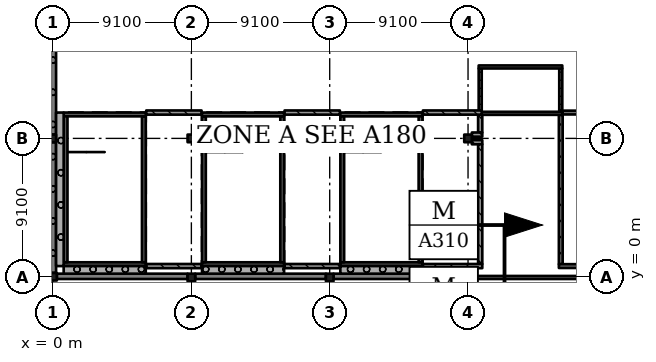
"""IFC4 building model, lengths in metres.
Left out: names, types, materials, properties, quantities, classifications, styles, units other than length and angle.
Written with IfcOpenShell. Run it as: python <this file> out.ifc"""

import sys

from ifc_helpers import new_model, si_unit, direction, frame, frame_2d, origin, origin_2d, place, context, subcontext, project, spatial, rectangle, extrude, element, fill, save


model = new_model("IFC4")
c1 = context("Model", 3, precision=1e-05, world=origin(), true_north=direction((0.0, 1.0)))
c2 = subcontext(c1, "Body", "Model", "MODEL_VIEW")
j1 = project(units=[si_unit("LENGTHUNIT", "METRE"), si_unit("PLANEANGLEUNIT", "RADIAN")], contexts=[c1])
p1 = place(None, origin())
s1 = spatial("IfcSite", under=j1, at=p1, CompositionType="ELEMENT")
p2 = place(p1, origin())
s2 = spatial("IfcBuilding", under=s1, at=p2, CompositionType="ELEMENT")
p3 = place(p2, frame((0.0, 0.0, 29.12)))
s3 = spatial("IfcBuildingStorey", under=s2, at=p3, CompositionType="ELEMENT", Elevation=29.12)
for number, where, z_axis, x_axis in (
    (1, (0.0, 0.0, 0.0), (0.0, 0.0, 1.0), (1.0, 0.0, 0.0)),
    (2, (-0.05, 9.1, 0.0), (0.0, 0.0, 1.0), (1.0, 0.0, 0.0)),
    (3, (9.1, -0.05, 0.0), (0.0, 0.0, 1.0), (1.0, 0.0, 0.0)),
    (4, (9.1, 9.1, 0.0), (0.0, 0.0, 1.0), (1.0, 0.0, 0.0)),
    (5, (18.2, -0.05, 0.0), (0.0, 0.0, 1.0), (1.0, 0.0, 0.0)),
    (6, (18.2, 9.1, 0.0), (0.0, 0.0, 1.0), (1.0, 0.0, 0.0)),
    (7, (27.3, -0.1, 0.0), (0.0, 0.0, 1.0), (1.0, 0.0, 0.0)),
    (8, (27.3, 9.1, 0.0), (0.0, 0.0, 1.0), (1.0, 0.0, 0.0)),
):
    element("IfcColumn", number, at=place(p3, frame(where, z_axis=z_axis, x_axis=x_axis)), inside=s3, PredefinedType="COLUMN", context=c2, shape_type="SweptSolid", body=[
        extrude(rectangle(XDim=0.5, YDim=0.5, at=origin_2d()), origin(), (0.0, 0.0, 1.0), 4.55),
    ])
p4 = place(p3, frame((6.1, 0.825, 0.0), z_axis=(0.0, 0.0, 1.0), x_axis=(-1.0, 0.0, 0.0)))
e9 = element("IfcWall", 9, at=p4, inside=s3, PredefinedType="SHEAR", context=c2, shape_type="SweptSolid", body=[
    extrude(rectangle(XDim=5.4, YDim=0.25, at=frame_2d((2.7, 0.0))), origin(), (0.0, 0.0, 1.0), 4.55),
])
p5 = place(p3, frame((6.1, 10.675, 0.0), z_axis=(0.0, 0.0, 1.0), x_axis=(-1.0, 0.0, 0.0)))
e10 = element("IfcWall", 10, at=p5, inside=s3, PredefinedType="SHEAR", context=c2, shape_type="SweptSolid", body=[
    extrude(rectangle(XDim=5.4, YDim=0.25, at=frame_2d((2.7, 0.0))), origin(), (0.0, 0.0, 1.0), 4.55),
])
p6 = place(p5, frame((1.5, 0.0, 0.0)))
e11 = element("IfcOpeningElement", 11, at=p6, cuts=e10, PredefinedType="OPENING", context=c2, shape_type="SweptSolid", body=[
    extrude(rectangle(XDim=2.4, YDim=2.1, at=frame_2d((1.2, 1.05))), frame((0.0, 0.135, 0.0), z_axis=(0.0, -1.0, 0.0), x_axis=(1.0, 0.0, 0.0)), (0.0, 0.0, 1.0), 0.27),
])
for number, where, z_axis, x_axis in (
    (12, (0.825, 10.55, 0.0), (0.0, 0.0, 1.0), (0.0, -1.0, 0.0)),
    (13, (5.975, 10.55, 0.0), (0.0, 0.0, 1.0), (0.0, -1.0, 0.0)),
):
    element("IfcWall", number, at=place(p3, frame(where, z_axis=z_axis, x_axis=x_axis)), inside=s3, PredefinedType="SHEAR", context=c2, shape_type="SweptSolid", body=[
        extrude(rectangle(XDim=9.6, YDim=0.25, at=frame_2d((4.8, 0.0))), origin(), (0.0, 0.0, 1.0), 4.55),
    ])
p7 = place(p3, frame((15.2, 0.825, 0.0), z_axis=(0.0, 0.0, 1.0), x_axis=(-1.0, 0.0, 0.0)))
e14 = element("IfcWall", 14, at=p7, inside=s3, PredefinedType="SHEAR", context=c2, shape_type="SweptSolid", body=[
    extrude(rectangle(XDim=5.4, YDim=0.25, at=frame_2d((2.7, 0.0))), origin(), (0.0, 0.0, 1.0), 4.55),
])
p8 = place(p3, frame((15.2, 10.675, 0.0), z_axis=(0.0, 0.0, 1.0), x_axis=(-1.0, 0.0, 0.0)))
e15 = element("IfcWall", 15, at=p8, inside=s3, PredefinedType="SHEAR", context=c2, shape_type="SweptSolid", body=[
    extrude(rectangle(XDim=5.4, YDim=0.25, at=frame_2d((2.7, 0.0))), origin(), (0.0, 0.0, 1.0), 4.55),
])
p9 = place(p8, frame((1.5, 0.0, 0.0)))
e16 = element("IfcOpeningElement", 16, at=p9, cuts=e15, PredefinedType="OPENING", context=c2, shape_type="SweptSolid", body=[
    extrude(rectangle(XDim=2.4, YDim=2.1, at=frame_2d((1.2, 1.05))), frame((0.0, 0.135, 0.0), z_axis=(0.0, -1.0, 0.0), x_axis=(1.0, 0.0, 0.0)), (0.0, 0.0, 1.0), 0.27),
])
for number, where, z_axis, x_axis in (
    (17, (9.925, 10.55, 0.0), (0.0, 0.0, 1.0), (0.0, -1.0, 0.0)),
    (18, (15.075, 10.55, 0.0), (0.0, 0.0, 1.0), (0.0, -1.0, 0.0)),
):
    element("IfcWall", number, at=place(p3, frame(where, z_axis=z_axis, x_axis=x_axis)), inside=s3, PredefinedType="SHEAR", context=c2, shape_type="SweptSolid", body=[
        extrude(rectangle(XDim=9.6, YDim=0.25, at=frame_2d((4.8, 0.0))), origin(), (0.0, 0.0, 1.0), 4.55),
    ])
p10 = place(p3, frame((24.3, 0.825, 0.0), z_axis=(0.0, 0.0, 1.0), x_axis=(-1.0, 0.0, 0.0)))
e19 = element("IfcWall", 19, at=p10, inside=s3, PredefinedType="SHEAR", context=c2, shape_type="SweptSolid", body=[
    extrude(rectangle(XDim=5.4, YDim=0.25, at=frame_2d((2.7, 0.0))), origin(), (0.0, 0.0, 1.0), 4.55),
])
p11 = place(p3, frame((24.3, 10.675, 0.0), z_axis=(0.0, 0.0, 1.0), x_axis=(-1.0, 0.0, 0.0)))
e20 = element("IfcWall", 20, at=p11, inside=s3, PredefinedType="SHEAR", context=c2, shape_type="SweptSolid", body=[
    extrude(rectangle(XDim=5.4, YDim=0.25, at=frame_2d((2.7, 0.0))), origin(), (0.0, 0.0, 1.0), 4.55),
])
p12 = place(p11, frame((1.5, 0.0, 0.0)))
e21 = element("IfcOpeningElement", 21, at=p12, cuts=e20, PredefinedType="OPENING", context=c2, shape_type="SweptSolid", body=[
    extrude(rectangle(XDim=2.4, YDim=2.1, at=frame_2d((1.2, 1.05))), frame((0.0, 0.135, 0.0), z_axis=(0.0, -1.0, 0.0), x_axis=(1.0, 0.0, 0.0)), (0.0, 0.0, 1.0), 0.27),
])
for number, where, z_axis, x_axis in (
    (22, (19.025, 10.55, 0.0), (0.0, 0.0, 1.0), (0.0, -1.0, 0.0)),
    (23, (24.175, 10.55, 0.0), (0.0, 0.0, 1.0), (0.0, -1.0, 0.0)),
):
    element("IfcWall", number, at=place(p3, frame(where, z_axis=z_axis, x_axis=x_axis)), inside=s3, PredefinedType="SHEAR", context=c2, shape_type="SweptSolid", body=[
        extrude(rectangle(XDim=9.6, YDim=0.25, at=frame_2d((4.8, 0.0))), origin(), (0.0, 0.0, 1.0), 4.55),
    ])
p13 = place(p3, frame((0.25, 0.025, 0.0), z_axis=(0.0, 0.0, 1.0), x_axis=(1.0, 0.0, 0.0)))
e24 = element("IfcWall", 24, at=p13, inside=s3, PredefinedType="SOLIDWALL", context=c2, shape_type="SweptSolid", body=[
    extrude(rectangle(XDim=8.6, YDim=0.35, at=frame_2d((4.3, 0.0))), origin(), (0.0, 0.0, 1.0), 4.5),
])
p14 = place(p3, frame((9.35, 0.025, 0.0), z_axis=(0.0, 0.0, 1.0), x_axis=(1.0, 0.0, 0.0)))
e25 = element("IfcWall", 25, at=p14, inside=s3, PredefinedType="SOLIDWALL", context=c2, shape_type="SweptSolid", body=[
    extrude(rectangle(XDim=8.6, YDim=0.35, at=frame_2d((4.3, 0.0))), origin(), (0.0, 0.0, 1.0), 4.5),
])
p15 = place(p3, frame((18.45, 0.025, 0.0), z_axis=(0.0, 0.0, 1.0), x_axis=(1.0, 0.0, 0.0)))
e26 = element("IfcWall", 26, at=p15, inside=s3, PredefinedType="SOLIDWALL", context=c2, shape_type="SweptSolid", body=[
    extrude(rectangle(XDim=8.6, YDim=0.35, at=frame_2d((4.3, 0.0))), origin(), (0.0, 0.0, 1.0), 4.5),
])
p16 = place(p3, frame((27.55, -0.05, 0.0), z_axis=(0.0, 0.0, 1.0), x_axis=(1.0, 0.0, 0.0)))
e27 = element("IfcWall", 27, at=p16, inside=s3, PredefinedType="SOLIDWALL", context=c2, shape_type="SweptSolid", body=[
    extrude(rectangle(XDim=8.6, YDim=0.2, at=frame_2d((4.3, 0.0))), origin(), (0.0, 0.0, 1.0), 4.5),
])
p17 = place(p16, frame((0.65, 0.0, 0.6)))
e28 = element("IfcOpeningElement", 28, at=p17, cuts=e27, PredefinedType="OPENING", context=c2, shape_type="SweptSolid", body=[
    extrude(rectangle(XDim=3.0, YDim=3.0, at=frame_2d((1.5, 1.5))), frame((0.0, 0.11, 0.0), z_axis=(0.0, -1.0, 0.0), x_axis=(1.0, 0.0, 0.0)), (0.0, 0.0, 1.0), 0.22),
])
p18 = place(p16, frame((4.95, 0.0, 0.6)))
e29 = element("IfcOpeningElement", 29, at=p18, cuts=e27, PredefinedType="OPENING", context=c2, shape_type="SweptSolid", body=[
    extrude(rectangle(XDim=3.0, YDim=3.0, at=frame_2d((1.5, 1.5))), frame((0.0, 0.11, 0.0), z_axis=(0.0, -1.0, 0.0), x_axis=(1.0, 0.0, 0.0)), (0.0, 0.0, 1.0), 0.22),
])
p19 = place(p3, frame((0.025, 17.95, 0.0), z_axis=(0.0, 0.0, 1.0), x_axis=(0.0, -1.0, 0.0)))
e30 = element("IfcWall", 30, at=p19, inside=s3, PredefinedType="SOLIDWALL", context=c2, shape_type="SweptSolid", body=[
    extrude(rectangle(XDim=8.6, YDim=0.35, at=frame_2d((4.3, 0.0))), origin(), (0.0, 0.0, 1.0), 4.5),
])
p20 = place(p3, frame((0.025, 8.85, 0.0), z_axis=(0.0, 0.0, 1.0), x_axis=(0.0, -1.0, 0.0)))
e31 = element("IfcWall", 31, at=p20, inside=s3, PredefinedType="SOLIDWALL", context=c2, shape_type="SweptSolid", body=[
    extrude(rectangle(XDim=8.6, YDim=0.35, at=frame_2d((4.3, 0.0))), origin(), (0.0, 0.0, 1.0), 4.5),
])
p21 = place(p3, frame((0.7, 0.45, 0.0), z_axis=(0.0, 0.0, 1.0), x_axis=(1.0, 0.0, 0.0)))
e32 = element("IfcWall", 32, at=p21, inside=s3, PredefinedType="SOLIDWALL", context=c2, shape_type="SweptSolid", body=[
    extrude(rectangle(XDim=5.4, YDim=0.5, at=frame_2d((2.7, 0.0))), origin(), (0.0, 0.0, 1.0), 3.88),
])
p22 = place(p3, frame((0.45, 0.7, 0.0), z_axis=(0.0, 0.0, 1.0), x_axis=(0.0, 1.0, 0.0)))
e33 = element("IfcWall", 33, at=p22, inside=s3, PredefinedType="SOLIDWALL", context=c2, shape_type="SweptSolid", body=[
    extrude(rectangle(XDim=10.1, YDim=0.5, at=frame_2d((5.05, 0.0))), origin(), (0.0, 0.0, 1.0), 3.88),
])
p23 = place(p3, frame((9.8, 0.45, 0.0), z_axis=(0.0, 0.0, 1.0), x_axis=(1.0, 0.0, 0.0)))
e34 = element("IfcWall", 34, at=p23, inside=s3, PredefinedType="SOLIDWALL", context=c2, shape_type="SweptSolid", body=[
    extrude(rectangle(XDim=5.4, YDim=0.5, at=frame_2d((2.7, 0.0))), origin(), (0.0, 0.0, 1.0), 3.88),
])
p24 = place(p3, frame((18.9, 0.45, 0.0), z_axis=(0.0, 0.0, 1.0), x_axis=(1.0, 0.0, 0.0)))
e35 = element("IfcWall", 35, at=p24, inside=s3, PredefinedType="SOLIDWALL", context=c2, shape_type="SweptSolid", body=[
    extrude(rectangle(XDim=5.4, YDim=0.5, at=frame_2d((2.7, 0.0))), origin(), (0.0, 0.0, 1.0), 3.88),
])
p25 = place(p3, frame((9.35, 8.85, 0.0), z_axis=(0.0, 0.0, 1.0), x_axis=(1.0, 0.0, 0.0)))
e36 = element("IfcWall", 36, at=p25, inside=s3, PredefinedType="SOLIDWALL", context=c2, shape_type="SweptSolid", body=[
    extrude(rectangle(XDim=0.42, YDim=0.275, at=frame_2d((0.21, 0.0))), origin(), (0.0, 0.0, 1.0), 3.88),
])
p26 = place(p3, frame((9.77, 0.7, 0.0), z_axis=(0.0, 0.0, 1.0), x_axis=(-1.0, 0.0, 0.0)))
e37 = element("IfcWall", 37, at=p26, inside=s3, PredefinedType="SOLIDWALL", context=c2, shape_type="SweptSolid", body=[
    extrude(rectangle(XDim=3.64, YDim=0.275, at=frame_2d((1.82, 0.0))), origin(), (0.0, 0.0, 1.0), 3.88),
])
p27 = place(p3, frame((9.77, 9.35, 0.0), z_axis=(0.0, 0.0, 1.0), x_axis=(-1.0, 0.0, 0.0)))
e38 = element("IfcWall", 38, at=p27, inside=s3, PredefinedType="SOLIDWALL", context=c2, shape_type="SweptSolid", body=[
    extrude(rectangle(XDim=0.42, YDim=0.275, at=frame_2d((0.21, 0.0))), origin(), (0.0, 0.0, 1.0), 3.88),
])
p28 = place(p3, frame((9.77, 10.8, 0.0), z_axis=(0.0, 0.0, 1.0), x_axis=(-1.0, 0.0, 0.0)))
e39 = element("IfcWall", 39, at=p28, inside=s3, PredefinedType="SOLIDWALL", context=c2, shape_type="SweptSolid", body=[
    extrude(rectangle(XDim=3.64, YDim=0.275, at=frame_2d((1.82, 0.0))), origin(), (0.0, 0.0, 1.0), 3.88),
])
p29 = place(p28, frame((1.25, 0.0, 0.0)))
e40 = element("IfcOpeningElement", 40, at=p29, cuts=e39, PredefinedType="OPENING", context=c2, shape_type="SweptSolid", body=[
    extrude(rectangle(XDim=1.2, YDim=2.4, at=frame_2d((0.6, 1.2))), frame((0.0, 0.147, 0.0), z_axis=(0.0, -1.0, 0.0), x_axis=(1.0, 0.0, 0.0)), (0.0, 0.0, 1.0), 0.295),
])
p30 = place(p3, frame((18.45, 8.85, 0.0), z_axis=(0.0, 0.0, 1.0), x_axis=(1.0, 0.0, 0.0)))
e41 = element("IfcWall", 41, at=p30, inside=s3, PredefinedType="SOLIDWALL", context=c2, shape_type="SweptSolid", body=[
    extrude(rectangle(XDim=0.42, YDim=0.275, at=frame_2d((0.21, 0.0))), origin(), (0.0, 0.0, 1.0), 3.88),
])
p31 = place(p3, frame((18.87, 0.7, 0.0), z_axis=(0.0, 0.0, 1.0), x_axis=(-1.0, 0.0, 0.0)))
e42 = element("IfcWall", 42, at=p31, inside=s3, PredefinedType="SOLIDWALL", context=c2, shape_type="SweptSolid", body=[
    extrude(rectangle(XDim=3.64, YDim=0.275, at=frame_2d((1.82, 0.0))), origin(), (0.0, 0.0, 1.0), 3.88),
])
p32 = place(p3, frame((18.87, 9.35, 0.0), z_axis=(0.0, 0.0, 1.0), x_axis=(-1.0, 0.0, 0.0)))
e43 = element("IfcWall", 43, at=p32, inside=s3, PredefinedType="SOLIDWALL", context=c2, shape_type="SweptSolid", body=[
    extrude(rectangle(XDim=0.42, YDim=0.275, at=frame_2d((0.21, 0.0))), origin(), (0.0, 0.0, 1.0), 3.88),
])
p33 = place(p3, frame((18.87, 10.8, 0.0), z_axis=(0.0, 0.0, 1.0), x_axis=(-1.0, 0.0, 0.0)))
e44 = element("IfcWall", 44, at=p33, inside=s3, PredefinedType="SOLIDWALL", context=c2, shape_type="SweptSolid", body=[
    extrude(rectangle(XDim=3.64, YDim=0.275, at=frame_2d((1.82, 0.0))), origin(), (0.0, 0.0, 1.0), 3.88),
])
p34 = place(p33, frame((1.25, 0.0, 0.0)))
e45 = element("IfcOpeningElement", 45, at=p34, cuts=e44, PredefinedType="OPENING", context=c2, shape_type="SweptSolid", body=[
    extrude(rectangle(XDim=1.2, YDim=2.4, at=frame_2d((0.6, 1.2))), frame((0.0, 0.147, 0.0), z_axis=(0.0, -1.0, 0.0), x_axis=(1.0, 0.0, 0.0)), (0.0, 0.0, 1.0), 0.295),
])
p35 = place(p3, frame((27.55, 8.85, 0.0), z_axis=(0.0, 0.0, 1.0), x_axis=(1.0, 0.0, 0.0)))
e46 = element("IfcWall", 46, at=p35, inside=s3, PredefinedType="SOLIDWALL", context=c2, shape_type="SweptSolid", body=[
    extrude(rectangle(XDim=0.688, YDim=0.275, at=frame_2d((0.344, 0.0))), origin(), (0.0, 0.0, 1.0), 3.88),
])
p36 = place(p3, frame((28.1, 8.712, 0.0), z_axis=(0.0, 0.0, 1.0), x_axis=(0.0, -1.0, 0.0)))
e47 = element("IfcWall", 47, at=p36, inside=s3, PredefinedType="SOLIDWALL", context=c2, shape_type="SweptSolid", body=[
    extrude(rectangle(XDim=7.875, YDim=0.275, at=frame_2d((3.938, 0.0))), origin(), (0.0, 0.0, 1.0), 3.88),
])
p37 = place(p3, frame((28.1, 10.65, 0.0), z_axis=(0.0, 0.0, 1.0), x_axis=(0.0, -1.0, 0.0)))
e48 = element("IfcWall", 48, at=p37, inside=s3, PredefinedType="SOLIDWALL", context=c2, shape_type="SweptSolid", body=[
    extrude(rectangle(XDim=1.162, YDim=0.275, at=frame_2d((0.581, 0.0))), origin(), (0.0, 0.0, 1.0), 3.88),
])
p38 = place(p3, frame((28.1, 13.7, 0.0), z_axis=(0.0, 0.0, 1.0), x_axis=(0.0, -1.0, 0.0)))
e49 = element("IfcWall", 49, at=p38, inside=s3, PredefinedType="PARTITIONING", context=c2, shape_type="SweptSolid", body=[
    extrude(rectangle(XDim=2.762, YDim=0.2, at=frame_2d((1.381, 0.0))), origin(), (0.0, 0.0, 1.0), 3.88),
])
p39 = place(p38, frame((0.45, 0.0, 0.0)))
e50 = element("IfcOpeningElement", 50, at=p39, cuts=e49, PredefinedType="OPENING", context=c2, shape_type="SweptSolid", body=[
    extrude(rectangle(XDim=1.8, YDim=2.4, at=frame_2d((0.9, 1.2))), frame((0.0, 0.11, 0.0), z_axis=(0.0, -1.0, 0.0), x_axis=(1.0, 0.0, 0.0)), (0.0, 0.0, 1.0), 0.22),
])
p40 = place(p3, frame((28.2, 10.8, 0.0), z_axis=(0.0, 0.0, 1.0), x_axis=(-1.0, 0.0, 0.0)))
e51 = element("IfcWall", 51, at=p40, inside=s3, PredefinedType="SOLIDWALL", context=c2, shape_type="SweptSolid", body=[
    extrude(rectangle(XDim=3.87, YDim=0.275, at=frame_2d((1.935, 0.0))), origin(), (0.0, 0.0, 1.0), 3.88),
])
p41 = place(p40, frame((1.35, 0.0, 0.0)))
e52 = element("IfcOpeningElement", 52, at=p41, cuts=e51, PredefinedType="OPENING", context=c2, shape_type="SweptSolid", body=[
    extrude(rectangle(XDim=1.2, YDim=2.4, at=frame_2d((0.6, 1.2))), frame((0.0, 0.147, 0.0), z_axis=(0.0, -1.0, 0.0), x_axis=(1.0, 0.0, 0.0)), (0.0, 0.0, 1.0), 0.295),
])
p42 = place(p3, frame((28.238, 0.7, 0.0), z_axis=(0.0, 0.0, 1.0), x_axis=(-1.0, 0.0, 0.0)))
e53 = element("IfcWall", 53, at=p42, inside=s3, PredefinedType="SOLIDWALL", context=c2, shape_type="SweptSolid", body=[
    extrude(rectangle(XDim=3.907, YDim=0.275, at=frame_2d((1.954, 0.0))), origin(), (0.0, 0.0, 1.0), 3.88),
])
p43 = place(p3, frame((28.238, 9.35, 0.0), z_axis=(0.0, 0.0, 1.0), x_axis=(-1.0, 0.0, 0.0)))
e54 = element("IfcWall", 54, at=p43, inside=s3, PredefinedType="SOLIDWALL", context=c2, shape_type="SweptSolid", body=[
    extrude(rectangle(XDim=0.688, YDim=0.275, at=frame_2d((0.344, 0.0))), origin(), (0.0, 0.0, 1.0), 3.88),
])
p44 = place(p3, frame((33.4, 0.825, 0.0), z_axis=(0.0, 0.0, 1.0), x_axis=(0.0, 1.0, 0.0)))
e55 = element("IfcWall", 55, at=p44, inside=s3, PredefinedType="SOLIDWALL", context=c2, shape_type="SweptSolid", body=[
    extrude(rectangle(XDim=9.825, YDim=0.25, at=frame_2d((4.913, 0.0))), origin(), (0.0, 0.0, 1.0), 3.88),
])
p45 = place(p3, frame((33.4, 10.925, 0.0), z_axis=(0.0, 0.0, 1.0), x_axis=(0.0, 1.0, 0.0)))
e56 = element("IfcWall", 56, at=p45, inside=s3, PredefinedType="PARTITIONING", context=c2, shape_type="SweptSolid", body=[
    extrude(rectangle(XDim=2.775, YDim=0.2, at=frame_2d((1.387, 0.0))), origin(), (0.0, 0.0, 1.0), 3.88),
])
p46 = place(p45, frame((0.45, 0.0, 0.0)))
e57 = element("IfcOpeningElement", 57, at=p46, cuts=e56, PredefinedType="OPENING", context=c2, shape_type="SweptSolid", body=[
    extrude(rectangle(XDim=1.8, YDim=2.4, at=frame_2d((0.9, 1.2))), frame((0.0, 0.11, 0.0), z_axis=(0.0, -1.0, 0.0), x_axis=(1.0, 0.0, 0.0)), (0.0, 0.0, 1.0), 0.22),
])
p47 = place(p3, frame((33.5, 13.8, 0.0), z_axis=(0.0, 0.0, 1.0), x_axis=(-1.0, 0.0, 0.0)))
e58 = element("IfcWall", 58, at=p47, inside=s3, PredefinedType="PARTITIONING", context=c2, shape_type="SweptSolid", body=[
    extrude(rectangle(XDim=5.5, YDim=0.2, at=frame_2d((2.75, 0.0))), origin(), (0.0, 0.0, 1.0), 3.88),
])
p48 = place(p47, frame((1.85, 0.0, 0.0)))
e59 = element("IfcOpeningElement", 59, at=p48, cuts=e58, PredefinedType="OPENING", context=c2, shape_type="SweptSolid", body=[
    extrude(rectangle(XDim=1.8, YDim=2.4, at=frame_2d((0.9, 1.2))), frame((0.0, 0.11, 0.0), z_axis=(0.0, -1.0, 0.0), x_axis=(1.0, 0.0, 0.0)), (0.0, 0.0, 1.0), 0.22),
])
p49 = place(p3, frame((33.525, 10.75, 0.0), z_axis=(0.0, 0.0, 1.0), x_axis=(-1.0, 0.0, 0.0)))
e60 = element("IfcWall", 60, at=p49, inside=s3, PredefinedType="PARTITIONING", context=c2, shape_type="SweptSolid", body=[
    extrude(rectangle(XDim=5.562, YDim=0.2, at=frame_2d((2.781, 0.0))), origin(), (0.0, 0.0, 1.0), 3.88),
])
p50 = place(p3, frame((36.275, 10.8, 0.0), z_axis=(0.0, 0.0, 1.0), x_axis=(-1.0, 0.0, 0.0)))
e61 = element("IfcWall", 61, at=p50, inside=s3, PredefinedType="SOLIDWALL", context=c2, shape_type="SweptSolid", body=[
    extrude(rectangle(XDim=2.975, YDim=0.25, at=frame_2d((1.487, 0.0))), origin(), (0.0, 0.0, 1.0), 3.88),
])
p51 = place(p3, frame((40.7, 0.7, 0.0), z_axis=(0.0, 0.0, 1.0), x_axis=(-1.0, 0.0, 0.0)))
e62 = element("IfcWall", 62, at=p51, inside=s3, PredefinedType="SOLIDWALL", context=c2, shape_type="SweptSolid", body=[
    extrude(rectangle(XDim=7.425, YDim=0.25, at=frame_2d((3.712, 0.0))), origin(), (0.0, 0.0, 1.0), 3.88),
])
p52 = place(p17, origin())
e63 = element("IfcWindow", 63, at=p52, inside=s3, PartitioningType="SINGLE_PANEL", PredefinedType="WINDOW", context=c2, shape_type="SweptSolid", body=[
    extrude(rectangle(XDim=3.0, YDim=3.0, at=frame_2d((1.5, 1.5))), frame((0.0, 0.03, 0.0), z_axis=(0.0, -1.0, 0.0), x_axis=(1.0, 0.0, 0.0)), (0.0, 0.0, 1.0), 0.06),
])
fill(e28, e63)
p53 = place(p18, origin())
e64 = element("IfcWindow", 64, at=p53, inside=s3, PartitioningType="SINGLE_PANEL", PredefinedType="WINDOW", context=c2, shape_type="SweptSolid", body=[
    extrude(rectangle(XDim=3.0, YDim=3.0, at=frame_2d((1.5, 1.5))), frame((0.0, 0.03, 0.0), z_axis=(0.0, -1.0, 0.0), x_axis=(1.0, 0.0, 0.0)), (0.0, 0.0, 1.0), 0.06),
])
fill(e29, e64)
p54 = place(p29, origin())
e65 = element("IfcDoor", 65, at=p54, inside=s3, OperationType="SINGLE_SWING_LEFT", PredefinedType="DOOR", context=c2, shape_type="SweptSolid", body=[
    extrude(rectangle(XDim=1.2, YDim=2.4, at=frame_2d((0.6, 1.2))), frame((0.0, 0.025, 0.0), z_axis=(0.0, -1.0, 0.0), x_axis=(1.0, 0.0, 0.0)), (0.0, 0.0, 1.0), 0.05),
])
fill(e40, e65)
p55 = place(p34, origin())
e66 = element("IfcDoor", 66, at=p55, inside=s3, OperationType="SINGLE_SWING_LEFT", PredefinedType="DOOR", context=c2, shape_type="SweptSolid", body=[
    extrude(rectangle(XDim=1.2, YDim=2.4, at=frame_2d((0.6, 1.2))), frame((0.0, 0.025, 0.0), z_axis=(0.0, -1.0, 0.0), x_axis=(1.0, 0.0, 0.0)), (0.0, 0.0, 1.0), 0.05),
])
fill(e45, e66)
p56 = place(p41, origin())
e67 = element("IfcDoor", 67, at=p56, inside=s3, OperationType="SINGLE_SWING_LEFT", PredefinedType="DOOR", context=c2, shape_type="SweptSolid", body=[
    extrude(rectangle(XDim=1.2, YDim=2.4, at=frame_2d((0.6, 1.2))), frame((0.0, 0.025, 0.0), z_axis=(0.0, -1.0, 0.0), x_axis=(1.0, 0.0, 0.0)), (0.0, 0.0, 1.0), 0.05),
])
fill(e52, e67)
p57 = place(p48, origin())
e68 = element("IfcDoor", 68, at=p57, inside=s3, OperationType="DOUBLE_DOOR_SINGLE_SWING", PredefinedType="DOOR", context=c2, shape_type="SweptSolid", body=[
    extrude(rectangle(XDim=1.8, YDim=2.4, at=frame_2d((0.9, 1.2))), frame((0.0, 0.025, 0.0), z_axis=(0.0, -1.0, 0.0), x_axis=(1.0, 0.0, 0.0)), (0.0, 0.0, 1.0), 0.05),
])
fill(e59, e68)
p58 = place(p46, origin())
e69 = element("IfcDoor", 69, at=p58, inside=s3, OperationType="DOUBLE_DOOR_SINGLE_SWING", PredefinedType="DOOR", context=c2, shape_type="SweptSolid", body=[
    extrude(rectangle(XDim=1.8, YDim=2.4, at=frame_2d((0.9, 1.2))), frame((0.0, 0.025, 0.0), z_axis=(0.0, -1.0, 0.0), x_axis=(1.0, 0.0, 0.0)), (0.0, 0.0, 1.0), 0.05),
])
fill(e57, e69)
p59 = place(p39, origin())
e70 = element("IfcDoor", 70, at=p59, inside=s3, OperationType="DOUBLE_DOOR_SINGLE_SWING", PredefinedType="DOOR", context=c2, shape_type="SweptSolid", body=[
    extrude(rectangle(XDim=1.8, YDim=2.4, at=frame_2d((0.9, 1.2))), frame((0.0, 0.025, 0.0), z_axis=(0.0, -1.0, 0.0), x_axis=(1.0, 0.0, 0.0)), (0.0, 0.0, 1.0), 0.05),
])
fill(e50, e70)
p60 = place(p6, origin())
e71 = element("IfcDoor", 71, at=p60, inside=s3, OperationType="DOUBLE_DOOR_SINGLE_SWING", PredefinedType="DOOR", context=c2, shape_type="SweptSolid", body=[
    extrude(rectangle(XDim=2.4, YDim=2.1, at=frame_2d((1.2, 1.05))), frame((0.0, 0.025, 0.0), z_axis=(0.0, -1.0, 0.0), x_axis=(1.0, 0.0, 0.0)), (0.0, 0.0, 1.0), 0.05),
])
fill(e11, e71)
p61 = place(p9, origin())
e72 = element("IfcDoor", 72, at=p61, inside=s3, OperationType="DOUBLE_DOOR_SINGLE_SWING", PredefinedType="DOOR", context=c2, shape_type="SweptSolid", body=[
    extrude(rectangle(XDim=2.4, YDim=2.1, at=frame_2d((1.2, 1.05))), frame((0.0, 0.025, 0.0), z_axis=(0.0, -1.0, 0.0), x_axis=(1.0, 0.0, 0.0)), (0.0, 0.0, 1.0), 0.05),
])
fill(e16, e72)
p62 = place(p12, origin())
e73 = element("IfcDoor", 73, at=p62, inside=s3, OperationType="DOUBLE_DOOR_SINGLE_SWING", PredefinedType="DOOR", context=c2, shape_type="SweptSolid", body=[
    extrude(rectangle(XDim=2.4, YDim=2.1, at=frame_2d((1.2, 1.05))), frame((0.0, 0.025, 0.0), z_axis=(0.0, -1.0, 0.0), x_axis=(1.0, 0.0, 0.0)), (0.0, 0.0, 1.0), 0.05),
])
fill(e21, e73)
save(model, sys.argv[1])
